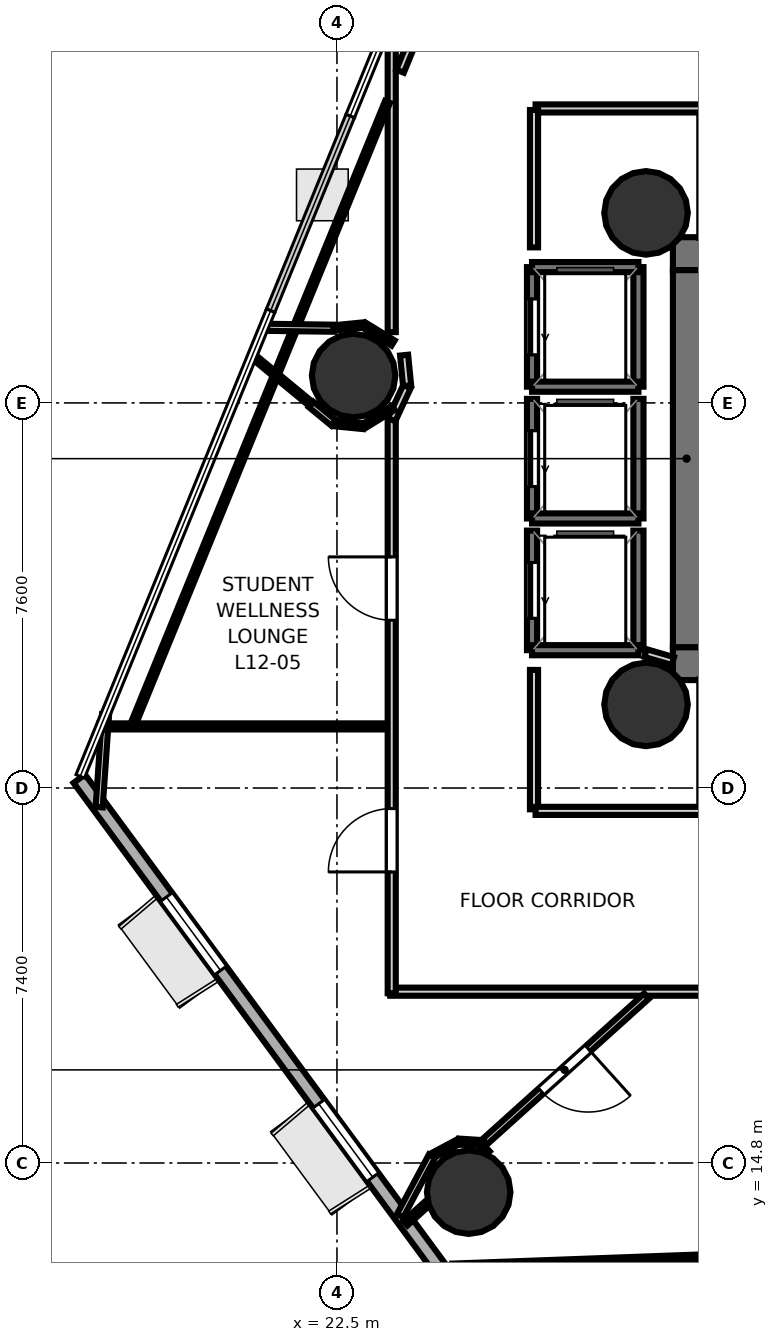
"""IFC4 building model, lengths in metres.
Left out: names, types, materials, properties, quantities, classifications, styles, units other than length and angle.
Written with IfcOpenShell. Run it as: python <this file> out.ifc"""

import sys

from ifc_helpers import new_model, si_unit, direction, frame, frame_2d, origin, origin_2d, place, context, subcontext, project, spatial, rectangle, hollow_circle, extrude, element, fill, save


model = new_model("IFC4")
c1 = context("Model", 3, precision=1e-05, world=origin(), true_north=direction((0.0, 1.0)))
c2 = subcontext(c1, "Body", "Model", "MODEL_VIEW")
j1 = project(units=[si_unit("LENGTHUNIT", "METRE"), si_unit("PLANEANGLEUNIT", "RADIAN")], contexts=[c1])
p1 = place(None, origin())
s1 = spatial("IfcSite", under=j1, at=p1, CompositionType="ELEMENT")
p2 = place(p1, origin())
s2 = spatial("IfcBuilding", under=s1, at=p2, CompositionType="ELEMENT")
p3 = place(p2, frame((0.0, 0.0, 52.5)))
s3 = spatial("IfcBuildingStorey", under=s2, at=p3, CompositionType="ELEMENT", Elevation=52.5)
p4 = place(p3, frame((29.13, 32.745, 0.0), z_axis=(0.0, 0.0, 1.0), x_axis=(1.0, 0.0, 0.0)))
e1 = element("IfcWall", 1, at=p4, inside=s3, PredefinedType="SHEAR", context=c2, shape_type="SweptSolid", body=[
    extrude(rectangle(XDim=10.72, YDim=0.65, at=frame_2d((5.36, 0.0))), origin(), (0.0, 0.0, 1.0), 3.52),
])
p5 = place(p4, frame((1.095, 0.0, 0.0)))
e2 = element("IfcOpeningElement", 2, at=p5, cuts=e1, PredefinedType="OPENING", context=c2, shape_type="SweptSolid", body=[
    extrude(rectangle(XDim=1.25, YDim=2.15, at=frame_2d((0.625, 1.075))), frame((0.0, 0.335, 0.0), z_axis=(0.0, -1.0, 0.0), x_axis=(1.0, 0.0, 0.0)), (0.0, 0.0, 1.0), 0.67),
])
p6 = place(p3, frame((29.13, 24.655, 0.0), z_axis=(0.0, 0.0, 1.0), x_axis=(1.0, 0.0, 0.0)))
e3 = element("IfcWall", 3, at=p6, inside=s3, PredefinedType="SHEAR", context=c2, shape_type="SweptSolid", body=[
    extrude(rectangle(XDim=10.72, YDim=0.65, at=frame_2d((5.36, 0.0))), origin(), (0.0, 0.0, 1.0), 3.52),
])
p7 = place(p6, frame((0.895, 0.0, 0.0)))
e4 = element("IfcOpeningElement", 4, at=p7, cuts=e3, PredefinedType="OPENING", context=c2, shape_type="SweptSolid", body=[
    extrude(rectangle(XDim=1.25, YDim=2.15, at=frame_2d((0.625, 1.075))), frame((0.0, 0.335, 0.0), z_axis=(0.0, -1.0, 0.0), x_axis=(1.0, 0.0, 0.0)), (0.0, 0.0, 1.0), 0.67),
])
p8 = place(p3, frame((29.455, 24.98, 0.0), z_axis=(0.0, 0.0, 1.0), x_axis=(0.0, 1.0, 0.0)))
e5 = element("IfcWall", 5, at=p8, inside=s3, PredefinedType="SHEAR", context=c2, shape_type="SweptSolid", body=[
    extrude(rectangle(XDim=7.44, YDim=0.65, at=frame_2d((3.72, 0.0))), origin(), (0.0, 0.0, 1.0), 3.52),
])
for number, where, z_axis, x_axis in (
    (6, (28.6, 33.55, 0.0), (0.0, 0.0, 1.0), (1.0, 0.0, 0.0)),
    (7, (28.6, 23.85, 0.0), (0.0, 0.0, 1.0), (1.0, 0.0, 0.0)),
):
    element("IfcColumn", number, at=place(p3, frame(where, z_axis=z_axis, x_axis=x_axis)), inside=s3, PredefinedType="COLUMN", context=c2, shape_type="SweptSolid", body=[
        extrude(hollow_circle(Radius=0.825, WallThickness=0.04, at=origin_2d()), origin(), (0.0, 0.0, 1.0), 3.7),
    ])
for number, where, z_axis, x_axis in (
    (8, (22.829, 30.34, -0.23), (0.0, 0.0, 1.0), (1.0, 0.0, 0.0)),
    (9, (25.1, 14.225, -0.23), (0.0, 0.0, 1.0), (1.0, 0.0, 0.0)),
):
    element("IfcColumn", number, at=place(p3, frame(where, z_axis=z_axis, x_axis=x_axis)), inside=s3, PredefinedType="COLUMN", context=c2, shape_type="SweptSolid", body=[
        extrude(hollow_circle(Radius=0.825, WallThickness=0.04, at=origin_2d()), origin(), (0.0, 0.0, 1.0), 3.93),
    ])
p9 = place(p3, frame((17.415, 22.384, 0.0), z_axis=(0.0, 0.0, 1.0), x_axis=(0.593055059992, -0.805161906587, 0.0)))
e10 = element("IfcWall", 10, at=p9, inside=s3, PredefinedType="SOLIDWALL", context=c2, shape_type="SweptSolid", body=[
    extrude(rectangle(XDim=12.668, YDim=0.28, at=frame_2d((6.334, 0.0))), origin(), (0.0, 0.0, 1.0), 3.52),
])
p10 = place(p9, frame((2.9, 0.0, 0.85)))
e11 = element("IfcOpeningElement", 11, at=p10, cuts=e10, PredefinedType="OPENING", context=c2, shape_type="SweptSolid", body=[
    extrude(rectangle(XDim=1.8, YDim=2.1, at=frame_2d((0.9, 1.05))), frame((0.0, 0.15, 0.0), z_axis=(0.0, -1.0, 0.0), x_axis=(1.0, 0.0, 0.0)), (0.0, 0.0, 1.0), 0.3),
])
p11 = place(p9, frame((7.968, 0.0, 0.85)))
e12 = element("IfcOpeningElement", 12, at=p11, cuts=e10, PredefinedType="OPENING", context=c2, shape_type="SweptSolid", body=[
    extrude(rectangle(XDim=1.8, YDim=2.1, at=frame_2d((0.9, 1.05))), frame((0.0, 0.15, 0.0), z_axis=(0.0, -1.0, 0.0), x_axis=(1.0, 0.0, 0.0)), (0.0, 0.0, 1.0), 0.3),
])
p12 = place(p3, frame((28.45, 30.12, 0.0), z_axis=(0.0, 0.0, 1.0), x_axis=(0.0, 1.0, 0.0)))
e13 = element("IfcWall", 13, at=p12, inside=s3, PredefinedType="SOLIDWALL", context=c2, shape_type="SweptSolid", body=[
    extrude(rectangle(XDim=2.36, YDim=0.2, at=frame_2d((1.18, 0.0))), origin(), (0.0, 0.0, 1.0), 3.52),
])
p13 = place(p3, frame((26.35, 30.12, 0.0), z_axis=(0.0, 0.0, 1.0), x_axis=(0.0, 1.0, 0.0)))
e14 = element("IfcWall", 14, at=p13, inside=s3, PredefinedType="SOLIDWALL", context=c2, shape_type="SweptSolid", body=[
    extrude(rectangle(XDim=2.36, YDim=0.2, at=frame_2d((1.18, 0.0))), origin(), (0.0, 0.0, 1.0), 3.52),
])
p14 = place(p13, frame((0.63, 0.0, 0.0)))
e15 = element("IfcOpeningElement", 15, at=p14, cuts=e14, PredefinedType="OPENING", context=c2, shape_type="SweptSolid", body=[
    extrude(rectangle(XDim=1.1, YDim=2.15, at=frame_2d((0.55, 1.075))), frame((0.0, 0.11, 0.0), z_axis=(0.0, -1.0, 0.0), x_axis=(1.0, 0.0, 0.0)), (0.0, 0.0, 1.0), 0.22),
])
for number, where, z_axis, x_axis in (
    (16, (26.35, 32.48, 0.0), (0.0, 0.0, 1.0), (1.0, 0.0, 0.0)),
    (17, (26.35, 30.12, 0.0), (0.0, 0.0, 1.0), (1.0, 0.0, 0.0)),
):
    element("IfcWall", number, at=place(p3, frame(where, z_axis=z_axis, x_axis=x_axis)), inside=s3, PredefinedType="SOLIDWALL", context=c2, shape_type="SweptSolid", body=[
        extrude(rectangle(XDim=2.1, YDim=0.2, at=frame_2d((1.05, 0.0))), origin(), (0.0, 0.0, 1.0), 3.52),
    ])
p15 = place(p3, frame((28.45, 27.52, 0.0), z_axis=(0.0, 0.0, 1.0), x_axis=(0.0, 1.0, 0.0)))
e18 = element("IfcWall", 18, at=p15, inside=s3, PredefinedType="SOLIDWALL", context=c2, shape_type="SweptSolid", body=[
    extrude(rectangle(XDim=2.36, YDim=0.2, at=frame_2d((1.18, 0.0))), origin(), (0.0, 0.0, 1.0), 3.52),
])
p16 = place(p3, frame((26.35, 27.52, 0.0), z_axis=(0.0, 0.0, 1.0), x_axis=(0.0, 1.0, 0.0)))
e19 = element("IfcWall", 19, at=p16, inside=s3, PredefinedType="SOLIDWALL", context=c2, shape_type="SweptSolid", body=[
    extrude(rectangle(XDim=2.36, YDim=0.2, at=frame_2d((1.18, 0.0))), origin(), (0.0, 0.0, 1.0), 3.52),
])
p17 = place(p16, frame((0.63, 0.0, 0.0)))
e20 = element("IfcOpeningElement", 20, at=p17, cuts=e19, PredefinedType="OPENING", context=c2, shape_type="SweptSolid", body=[
    extrude(rectangle(XDim=1.1, YDim=2.15, at=frame_2d((0.55, 1.075))), frame((0.0, 0.11, 0.0), z_axis=(0.0, -1.0, 0.0), x_axis=(1.0, 0.0, 0.0)), (0.0, 0.0, 1.0), 0.22),
])
p18 = place(p3, frame((26.35, 27.52, 0.0), z_axis=(0.0, 0.0, 1.0), x_axis=(1.0, 0.0, 0.0)))
e21 = element("IfcWall", 21, at=p18, inside=s3, PredefinedType="SOLIDWALL", context=c2, shape_type="SweptSolid", body=[
    extrude(rectangle(XDim=2.1, YDim=0.2, at=frame_2d((1.05, 0.0))), origin(), (0.0, 0.0, 1.0), 3.52),
])
p19 = place(p3, frame((28.45, 24.92, 0.0), z_axis=(0.0, 0.0, 1.0), x_axis=(0.0, 1.0, 0.0)))
e22 = element("IfcWall", 22, at=p19, inside=s3, PredefinedType="SOLIDWALL", context=c2, shape_type="SweptSolid", body=[
    extrude(rectangle(XDim=2.36, YDim=0.2, at=frame_2d((1.18, 0.0))), origin(), (0.0, 0.0, 1.0), 3.52),
])
p20 = place(p3, frame((26.35, 24.92, 0.0), z_axis=(0.0, 0.0, 1.0), x_axis=(0.0, 1.0, 0.0)))
e23 = element("IfcWall", 23, at=p20, inside=s3, PredefinedType="SOLIDWALL", context=c2, shape_type="SweptSolid", body=[
    extrude(rectangle(XDim=2.36, YDim=0.2, at=frame_2d((1.18, 0.0))), origin(), (0.0, 0.0, 1.0), 3.52),
])
p21 = place(p20, frame((0.63, 0.0, 0.0)))
e24 = element("IfcOpeningElement", 24, at=p21, cuts=e23, PredefinedType="OPENING", context=c2, shape_type="SweptSolid", body=[
    extrude(rectangle(XDim=1.1, YDim=2.15, at=frame_2d((0.55, 1.075))), frame((0.0, 0.11, 0.0), z_axis=(0.0, -1.0, 0.0), x_axis=(1.0, 0.0, 0.0)), (0.0, 0.0, 1.0), 0.22),
])
p22 = place(p3, frame((26.35, 24.92, 0.0), z_axis=(0.0, 0.0, 1.0), x_axis=(1.0, 0.0, 0.0)))
e25 = element("IfcWall", 25, at=p22, inside=s3, PredefinedType="SOLIDWALL", context=c2, shape_type="SweptSolid", body=[
    extrude(rectangle(XDim=2.1, YDim=0.2, at=frame_2d((1.05, 0.0))), origin(), (0.0, 0.0, 1.0), 3.52),
])
p23 = place(p3, frame((29.13, 24.706, 0.0), z_axis=(0.0, 0.0, 1.0), x_axis=(-0.960451214223, 0.278448316742, 0.0)))
e26 = element("IfcWall", 26, at=p23, inside=s3, PredefinedType="PARTITIONING", context=c2, shape_type="SweptSolid", body=[
    extrude(rectangle(XDim=0.562, YDim=0.16, at=frame_2d((0.281, 0.0))), origin(), (0.0, 0.0, 1.0), 2.84),
])
p24 = place(p3, frame((23.581, 31.197, 0.0), z_axis=(0.0, 0.0, 1.0), x_axis=(0.0, 1.0, 0.0)))
e27 = element("IfcWall", 27, at=p24, inside=s3, PredefinedType="PARTITIONING", context=c2, shape_type="SweptSolid", body=[
    extrude(rectangle(XDim=6.287, YDim=0.16, at=frame_2d((3.144, 0.0))), origin(), (0.0, 0.0, 1.0), 2.798),
])
p25 = place(p3, frame((23.746, 36.346, 0.0), z_axis=(0.0, 0.0, 1.0), x_axis=(0.378431081054, 0.925629470627, 0.0)))
e28 = element("IfcWall", 28, at=p25, inside=s3, PredefinedType="PARTITIONING", context=c2, shape_type="SweptSolid", body=[
    extrude(rectangle(XDim=2.639, YDim=0.16, at=frame_2d((1.319, 0.0))), origin(), (0.0, 0.0, 1.0), 2.84),
])
p26 = place(p3, frame((29.7, 35.611, 0.0), z_axis=(0.0, 0.0, 1.0), x_axis=(-1.0, 0.0, 0.0)))
e29 = element("IfcWall", 29, at=p26, inside=s3, PredefinedType="PARTITIONING", context=c2, shape_type="SweptSolid", body=[
    extrude(rectangle(XDim=3.28, YDim=0.16, at=frame_2d((1.64, 0.0))), origin(), (0.0, 0.0, 1.0), 2.798),
])
p27 = place(p3, frame((26.389, 35.58, 0.0), z_axis=(0.0, 0.0, 1.0), x_axis=(0.0, -1.0, 0.0)))
e30 = element("IfcWall", 30, at=p27, inside=s3, PredefinedType="PARTITIONING", context=c2, shape_type="SweptSolid", body=[
    extrude(rectangle(XDim=2.71, YDim=0.16, at=frame_2d((1.355, 0.0))), origin(), (0.0, 0.0, 1.0), 2.798),
])
p28 = place(p3, frame((26.389, 24.531, 0.0), z_axis=(0.0, 0.0, 1.0), x_axis=(0.0, -1.0, 0.0)))
e31 = element("IfcWall", 31, at=p28, inside=s3, PredefinedType="PARTITIONING", context=c2, shape_type="SweptSolid", body=[
    extrude(rectangle(XDim=2.75, YDim=0.16, at=frame_2d((1.375, 0.0))), origin(), (0.0, 0.0, 1.0), 2.84),
])
p29 = place(p3, frame((26.42, 21.749, 0.0), z_axis=(0.0, 0.0, 1.0), x_axis=(1.0, 0.0, 0.0)))
e32 = element("IfcWall", 32, at=p29, inside=s3, PredefinedType="PARTITIONING", context=c2, shape_type="SweptSolid", body=[
    extrude(rectangle(XDim=3.28, YDim=0.16, at=frame_2d((1.64, 0.0))), origin(), (0.0, 0.0, 1.0), 2.84),
])
p30 = place(p3, frame((33.32, 18.181, 0.0), z_axis=(0.0, 0.0, 1.0), x_axis=(-1.0, 0.0, 0.0)))
e33 = element("IfcWall", 33, at=p30, inside=s3, PredefinedType="PARTITIONING", context=c2, shape_type="SweptSolid", body=[
    extrude(rectangle(XDim=9.77, YDim=0.16, at=frame_2d((4.885, 0.0))), origin(), (0.0, 0.0, 1.0), 2.798),
])
p31 = place(p3, frame((23.581, 18.15, 0.0), z_axis=(0.0, 0.0, 1.0), x_axis=(0.0, 1.0, 0.0)))
e34 = element("IfcWall", 34, at=p31, inside=s3, PredefinedType="PARTITIONING", context=c2, shape_type="SweptSolid", body=[
    extrude(rectangle(XDim=11.333, YDim=0.16, at=frame_2d((5.667, 0.0))), origin(), (0.0, 0.0, 1.0), 2.798),
])
p32 = place(p31, frame((2.394, 0.0, 0.0)))
e35 = element("IfcOpeningElement", 35, at=p32, cuts=e34, PredefinedType="OPENING", context=c2, shape_type="SweptSolid", body=[
    extrude(rectangle(XDim=1.25, YDim=2.2, at=frame_2d((0.625, 1.1))), frame((0.0, 0.09, 0.0), z_axis=(0.0, -1.0, 0.0), x_axis=(1.0, 0.0, 0.0)), (0.0, 0.0, 1.0), 0.18),
])
p33 = place(p31, frame((7.361, 0.0, 0.0)))
e36 = element("IfcOpeningElement", 36, at=p33, cuts=e34, PredefinedType="OPENING", context=c2, shape_type="SweptSolid", body=[
    extrude(rectangle(XDim=1.25, YDim=2.2, at=frame_2d((0.625, 1.1))), frame((0.0, 0.09, 0.0), z_axis=(0.0, -1.0, 0.0), x_axis=(1.0, 0.0, 0.0)), (0.0, 0.0, 1.0), 0.18),
])
p34 = place(p3, frame((23.578, 29.47, 0.0), z_axis=(0.0, 0.0, 1.0), x_axis=(0.421827918194, 0.906675910914, 0.0)))
e37 = element("IfcWall", 37, at=p34, inside=s3, PredefinedType="PARTITIONING", context=c2, shape_type="SweptSolid", body=[
    extrude(rectangle(XDim=0.72, YDim=0.16, at=frame_2d((0.36, 0.0))), origin(), (0.0, 0.0, 1.0), 2.84),
])
p35 = place(p3, frame((23.885, 30.139, 0.0), z_axis=(0.0, 0.0, 1.0), x_axis=(-0.0981888168, 0.995167803064, 0.0)))
e38 = element("IfcWall", 38, at=p35, inside=s3, PredefinedType="PARTITIONING", context=c2, shape_type="SweptSolid", body=[
    extrude(rectangle(XDim=0.607, YDim=0.16, at=frame_2d((0.303, 0.0))), origin(), (0.0, 0.0, 1.0), 2.84),
])
p36 = place(p3, frame((28.609, 18.093, 0.0), z_axis=(0.0, 0.0, 1.0), x_axis=(-0.743149021346, -0.669125946345, 0.0)))
e39 = element("IfcWall", 39, at=p36, inside=s3, PredefinedType="PARTITIONING", context=c2, shape_type="SweptSolid", body=[
    extrude(rectangle(XDim=4.35, YDim=0.14, at=frame_2d((2.175, 0.0))), origin(), (0.0, 0.0, 1.0), 2.84),
])
p37 = place(p36, frame((1.55, 0.0, 0.0)))
e40 = element("IfcOpeningElement", 40, at=p37, cuts=e39, PredefinedType="OPENING", context=c2, shape_type="SweptSolid", body=[
    extrude(rectangle(XDim=1.25, YDim=2.2, at=frame_2d((0.625, 1.1))), frame((0.0, 0.08, 0.0), z_axis=(0.0, -1.0, 0.0), x_axis=(1.0, 0.0, 0.0)), (0.0, 0.0, 1.0), 0.16),
])
p38 = place(p3, frame((25.399, 15.19, 0.0), z_axis=(0.0, 0.0, 1.0), x_axis=(-0.99790462735, 0.064702045664, 0.0)))
e41 = element("IfcWall", 41, at=p38, inside=s3, PredefinedType="PARTITIONING", context=c2, shape_type="SweptSolid", body=[
    extrude(rectangle(XDim=0.49, YDim=0.12, at=frame_2d((0.245, 0.0))), origin(), (0.0, 0.0, 1.0), 2.798),
])
p39 = place(p3, frame((24.893, 15.219, 0.0), z_axis=(0.0, 0.0, 1.0), x_axis=(-0.881797026047, -0.4716290967, 0.0)))
e42 = element("IfcWall", 42, at=p39, inside=s3, PredefinedType="PARTITIONING", context=c2, shape_type="SweptSolid", body=[
    extrude(rectangle(XDim=0.572, YDim=0.105, at=frame_2d((0.286, 0.0))), origin(), (0.0, 0.0, 1.0), 2.798),
])
p40 = place(p3, frame((24.376, 14.936, 0.0), z_axis=(0.0, 0.0, 1.0), x_axis=(-0.471526712387, -0.881851778649, 0.0)))
e43 = element("IfcWall", 43, at=p40, inside=s3, PredefinedType="PARTITIONING", context=c2, shape_type="SweptSolid", body=[
    extrude(rectangle(XDim=1.336, YDim=0.14, at=frame_2d((0.668, 0.0))), origin(), (0.0, 0.0, 1.0), 2.84),
])
p41 = place(p3, frame((17.807, 21.822, 0.0), z_axis=(0.0, 0.0, 1.0), x_axis=(0.068902522624, 0.997623397067, 0.0)))
e44 = element("IfcWall", 44, at=p41, inside=s3, PredefinedType="PARTITIONING", context=c2, shape_type="SweptSolid", body=[
    extrude(rectangle(XDim=1.835, YDim=0.14, at=frame_2d((0.918, 0.0))), origin(), (0.0, 0.0, 1.0), 2.84),
])
p42 = place(p3, frame((17.816, 23.416, 0.0), z_axis=(0.0, 0.0, 1.0), x_axis=(1.0, 0.0, 0.0)))
e45 = element("IfcWall", 45, at=p42, inside=s3, PredefinedType="PARTITIONING", context=c2, shape_type="SweptSolid", body=[
    extrude(rectangle(XDim=5.657, YDim=0.12, at=frame_2d((2.828, 0.0))), origin(), (0.0, 0.0, 1.0), 2.84),
])
p43 = place(p3, frame((23.851, 13.612, 0.0), z_axis=(0.0, 0.0, 1.0), x_axis=(0.74313295916, 0.669143785004, 0.0)))
e46 = element("IfcWall", 46, at=p43, inside=s3, PredefinedType="PARTITIONING", context=c2, shape_type="SweptSolid", body=[
    extrude(rectangle(XDim=2.184, YDim=0.12, at=frame_2d((1.092, 0.0))), origin(), (0.0, 0.0, 1.0), 2.798),
])
p44 = place(p3, frame((53.634, 13.82, 0.0), z_axis=(0.0, 0.0, 1.0), x_axis=(-0.99932003566, -0.036870941526, 0.0)))
e47 = element("IfcWall", 47, at=p44, inside=s3, PredefinedType="PARTITIONING", context=c2, shape_type="SweptSolid", body=[
    extrude(rectangle(XDim=28.876, YDim=0.12, at=frame_2d((14.438, 0.0))), origin(), (0.0, 0.0, 1.0), 2.798),
])
p45 = place(p3, frame((18.501, 23.519, 0.0), z_axis=(0.0, 0.0, 1.0), x_axis=(0.378498212097, 0.925602022167, 0.0)))
e48 = element("IfcWall", 48, at=p45, inside=s3, PredefinedType="PARTITIONING", context=c2, shape_type="SweptSolid", body=[
    extrude(rectangle(XDim=13.204, YDim=0.105, at=frame_2d((6.602, 0.0))), origin(), (0.0, 0.0, 1.0), 2.798),
])
p46 = place(p3, frame((23.608, 30.982, 0.0), z_axis=(0.0, 0.0, 1.0), x_axis=(-0.852045812822, 0.523467222328, 0.0)))
e49 = element("IfcWall", 49, at=p46, inside=s3, PredefinedType="PARTITIONING", context=c2, shape_type="SweptSolid", body=[
    extrude(rectangle(XDim=0.67, YDim=0.12, at=frame_2d((0.335, 0.0))), origin(), (0.0, 0.0, 1.0), 2.798),
])
p47 = place(p3, frame((23.018, 31.337, 0.0), z_axis=(0.0, 0.0, 1.0), x_axis=(-0.995208995167, -0.097770424665, 0.0)))
e50 = element("IfcWall", 50, at=p47, inside=s3, PredefinedType="PARTITIONING", context=c2, shape_type="SweptSolid", body=[
    extrude(rectangle(XDim=0.572, YDim=0.105, at=frame_2d((0.286, 0.0))), origin(), (0.0, 0.0, 1.0), 2.798),
])
p48 = place(p3, frame((22.432, 31.274, 0.0), z_axis=(0.0, 0.0, 1.0), x_axis=(-0.999906553017, 0.013670597405, 0.0)))
e51 = element("IfcWall", 51, at=p48, inside=s3, PredefinedType="PARTITIONING", context=c2, shape_type="SweptSolid", body=[
    extrude(rectangle(XDim=1.375, YDim=0.14, at=frame_2d((0.688, 0.0))), origin(), (0.0, 0.0, 1.0), 2.798),
])
p49 = place(p3, frame((20.829, 30.734, 0.0), z_axis=(0.0, 0.0, 1.0), x_axis=(0.771268902295, -0.636509450325, 0.0)))
e52 = element("IfcWall", 52, at=p49, inside=s3, PredefinedType="PARTITIONING", context=c2, shape_type="SweptSolid", body=[
    extrude(rectangle(XDim=1.493, YDim=0.105, at=frame_2d((0.747, 0.0))), origin(), (0.0, 0.0, 1.0), 2.84),
])
p50 = place(p3, frame((21.99, 29.769, 0.0), z_axis=(0.0, 0.0, 1.0), x_axis=(0.773062635709, -0.634329694458, 0.0)))
e53 = element("IfcWall", 53, at=p50, inside=s3, PredefinedType="PARTITIONING", context=c2, shape_type="SweptSolid", body=[
    extrude(rectangle(XDim=0.572, YDim=0.14, at=frame_2d((0.286, 0.0))), origin(), (0.0, 0.0, 1.0), 2.84),
])
p51 = place(p3, frame((22.449, 29.399, 0.0), z_axis=(0.0, 0.0, 1.0), x_axis=(0.995167364461, -0.098193262045, 0.0)))
e54 = element("IfcWall", 54, at=p51, inside=s3, PredefinedType="PARTITIONING", context=c2, shape_type="SweptSolid", body=[
    extrude(rectangle(XDim=0.572, YDim=0.12, at=frame_2d((0.286, 0.0))), origin(), (0.0, 0.0, 1.0), 2.798),
])
p52 = place(p3, frame((23.038, 29.348, 0.0), z_axis=(0.0, 0.0, 1.0), x_axis=(0.850157603054, 0.526528299306, 0.0)))
e55 = element("IfcWall", 55, at=p52, inside=s3, PredefinedType="PARTITIONING", context=c2, shape_type="SweptSolid", body=[
    extrude(rectangle(XDim=0.677, YDim=0.105, at=frame_2d((0.339, 0.0))), origin(), (0.0, 0.0, 1.0), 2.798),
])
p53 = place(p14, origin())
e56 = element("IfcDoor", 56, at=p53, inside=s3, OperationType="SLIDING_TO_LEFT", PredefinedType="DOOR", context=c2, shape_type="SweptSolid", body=[
    extrude(rectangle(XDim=1.1, YDim=2.15, at=frame_2d((0.55, 1.075))), frame((0.0, 0.025, 0.0), z_axis=(0.0, -1.0, 0.0), x_axis=(1.0, 0.0, 0.0)), (0.0, 0.0, 1.0), 0.05),
])
fill(e15, e56)
p54 = place(p17, origin())
e57 = element("IfcDoor", 57, at=p54, inside=s3, OperationType="SLIDING_TO_LEFT", PredefinedType="DOOR", context=c2, shape_type="SweptSolid", body=[
    extrude(rectangle(XDim=1.1, YDim=2.15, at=frame_2d((0.55, 1.075))), frame((0.0, 0.025, 0.0), z_axis=(0.0, -1.0, 0.0), x_axis=(1.0, 0.0, 0.0)), (0.0, 0.0, 1.0), 0.05),
])
fill(e20, e57)
p55 = place(p21, origin())
e58 = element("IfcDoor", 58, at=p55, inside=s3, OperationType="SLIDING_TO_LEFT", PredefinedType="DOOR", context=c2, shape_type="SweptSolid", body=[
    extrude(rectangle(XDim=1.1, YDim=2.15, at=frame_2d((0.55, 1.075))), frame((0.0, 0.025, 0.0), z_axis=(0.0, -1.0, 0.0), x_axis=(1.0, 0.0, 0.0)), (0.0, 0.0, 1.0), 0.05),
])
fill(e24, e58)
p56 = place(p32, origin())
e59 = element("IfcDoor", 59, at=p56, inside=s3, OperationType="SINGLE_SWING_LEFT", PredefinedType="DOOR", context=c2, shape_type="SweptSolid", body=[
    extrude(rectangle(XDim=1.25, YDim=2.2, at=frame_2d((0.625, 1.1))), frame((0.0, 0.025, 0.0), z_axis=(0.0, -1.0, 0.0), x_axis=(1.0, 0.0, 0.0)), (0.0, 0.0, 1.0), 0.05),
])
fill(e35, e59)
p57 = place(p33, origin())
e60 = element("IfcDoor", 60, at=p57, inside=s3, OperationType="SINGLE_SWING_RIGHT", PredefinedType="DOOR", context=c2, shape_type="SweptSolid", body=[
    extrude(rectangle(XDim=1.25, YDim=2.2, at=frame_2d((0.625, 1.1))), frame((0.0, 0.025, 0.0), z_axis=(0.0, -1.0, 0.0), x_axis=(1.0, 0.0, 0.0)), (0.0, 0.0, 1.0), 0.05),
])
fill(e36, e60)
p58 = place(p37, origin())
e61 = element("IfcDoor", 61, at=p58, inside=s3, OperationType="SINGLE_SWING_LEFT", PredefinedType="DOOR", context=c2, shape_type="SweptSolid", body=[
    extrude(rectangle(XDim=1.25, YDim=2.2, at=frame_2d((0.625, 1.1))), frame((0.0, 0.025, 0.0), z_axis=(0.0, -1.0, 0.0), x_axis=(1.0, 0.0, 0.0)), (0.0, 0.0, 1.0), 0.05),
])
fill(e40, e61)
p59 = place(p10, origin())
e62 = element("IfcWindow", 62, at=p59, inside=s3, PartitioningType="SINGLE_PANEL", PredefinedType="WINDOW", context=c2, shape_type="SweptSolid", body=[
    extrude(rectangle(XDim=1.8, YDim=2.1, at=frame_2d((0.9, 1.05))), frame((0.0, 0.03, 0.0), z_axis=(0.0, -1.0, 0.0), x_axis=(1.0, 0.0, 0.0)), (0.0, 0.0, 1.0), 0.06),
])
fill(e11, e62)
p60 = place(p11, origin())
e63 = element("IfcWindow", 63, at=p60, inside=s3, PartitioningType="SINGLE_PANEL", PredefinedType="WINDOW", context=c2, shape_type="SweptSolid", body=[
    extrude(rectangle(XDim=1.8, YDim=2.1, at=frame_2d((0.9, 1.05))), frame((0.0, 0.03, 0.0), z_axis=(0.0, -1.0, 0.0), x_axis=(1.0, 0.0, 0.0)), (0.0, 0.0, 1.0), 0.06),
])
fill(e12, e63)
save(model, sys.argv[1])
